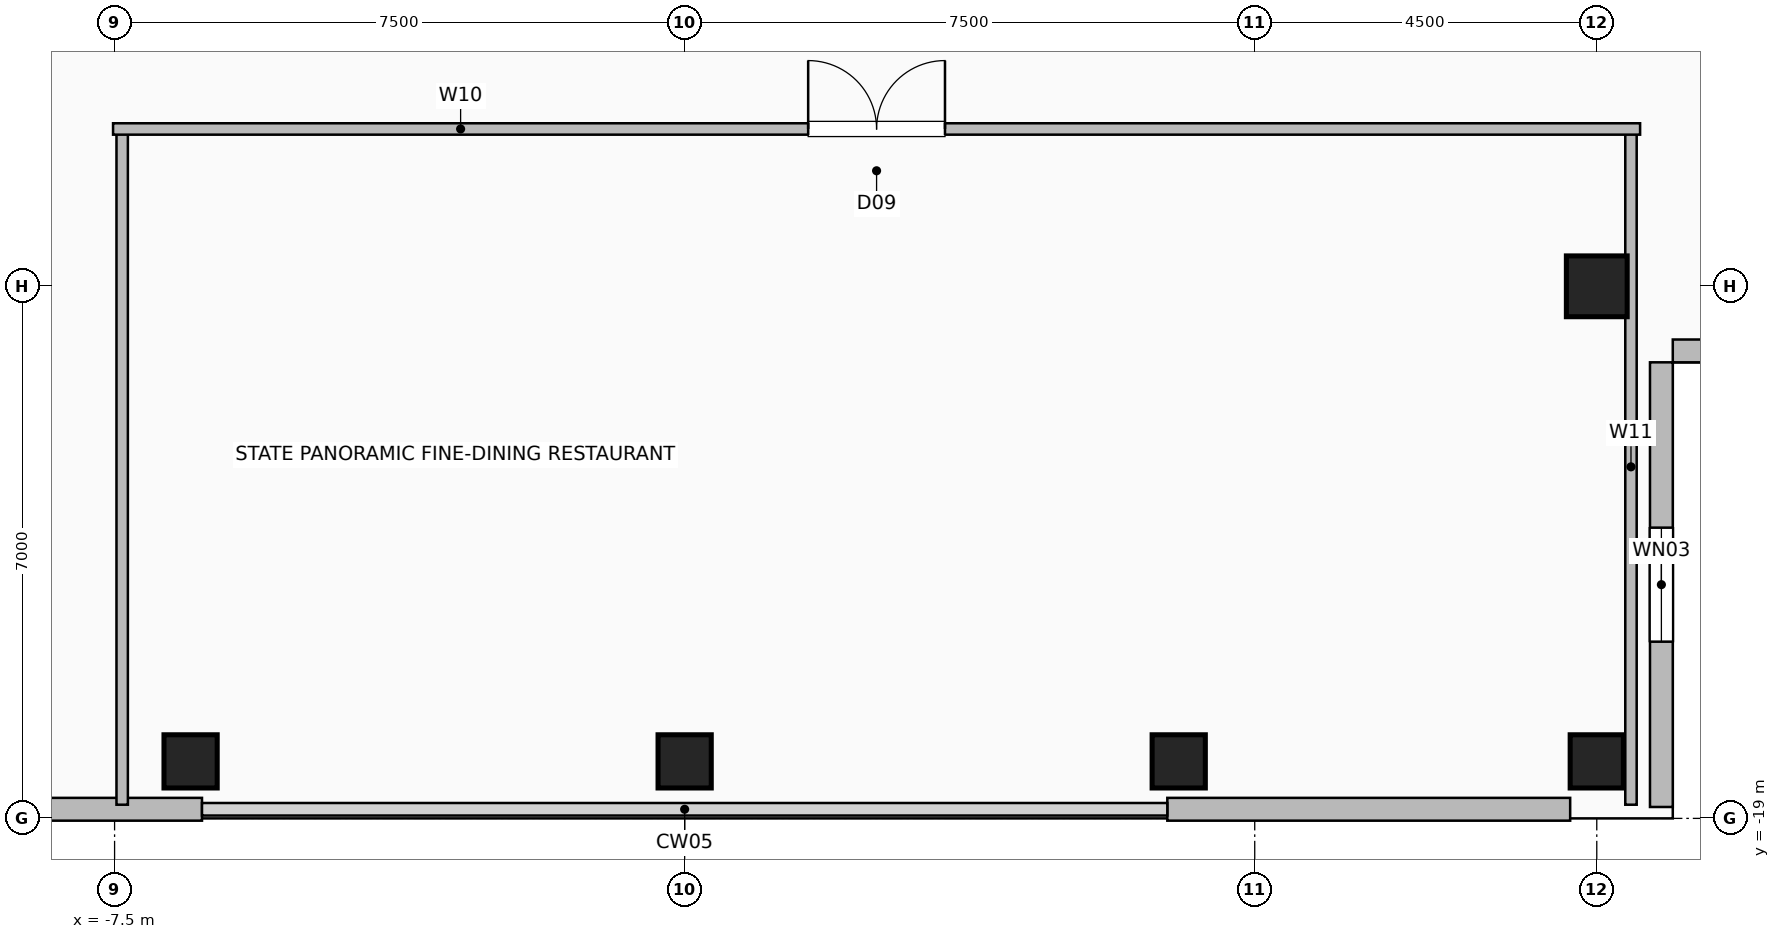
"""IFC4 building model, lengths in metres.
Left out: names, types, materials, properties, quantities, classifications, styles, units other than length and angle.
Written with IfcOpenShell. Run it as: python <this file> out.ifc"""

import sys

from ifc_helpers import new_model, si_unit, direction, frame, frame_2d, origin, origin_2d, place, context, subcontext, project, spatial, rectangle, hollow_rectangle, extrude, element, fill, save


model = new_model("IFC4")
c1 = context("Model", 3, precision=1e-05, world=origin(), true_north=direction((0.0, 1.0)))
c2 = subcontext(c1, "Body", "Model", "MODEL_VIEW")
j1 = project(units=[si_unit("LENGTHUNIT", "METRE"), si_unit("PLANEANGLEUNIT", "RADIAN")], contexts=[c1])
p1 = place(None, origin())
s1 = spatial("IfcSite", under=j1, at=p1, CompositionType="ELEMENT")
p2 = place(p1, origin())
s2 = spatial("IfcBuilding", under=s1, at=p2, CompositionType="ELEMENT")
p3 = place(p2, frame((0.0, 0.0, 257.6)))
s3 = spatial("IfcBuildingStorey", under=s2, at=p3, CompositionType="ELEMENT", Elevation=257.6)
for number, where, z_axis, x_axis in (
    (1, (-6.5, -18.25, 0.0), (0.0, 0.0, 1.0), (1.0, 0.0, 0.0)),
    (2, (0.0, -18.25, 0.0), (0.0, 0.0, 1.0), (1.0, 0.0, 0.0)),
    (3, (6.5, -18.25, 0.0), (0.0, 0.0, 1.0), (1.0, 0.0, 0.0)),
    (4, (12.0, -18.25, 0.0), (0.0, 0.0, 1.0), (1.0, 0.0, 0.0)),
):
    element("IfcColumn", number, at=place(p3, frame(where, z_axis=z_axis, x_axis=x_axis)), inside=s3, PredefinedType="COLUMN", context=c2, shape_type="SweptSolid", body=[
        extrude(hollow_rectangle(XDim=0.7, YDim=0.7, WallThickness=0.035, at=origin_2d()), origin(), (0.0, 0.0, 1.0), 3.6),
    ])
p4 = place(p3, frame((12.0, -12.0, 0.0), z_axis=(0.0, 0.0, 1.0), x_axis=(1.0, 0.0, 0.0)))
e5 = element("IfcColumn", 5, at=p4, inside=s3, PredefinedType="COLUMN", context=c2, shape_type="SweptSolid", body=[
    extrude(hollow_rectangle(XDim=0.8, YDim=0.8, WallThickness=0.04, at=origin_2d()), origin(), (0.0, 0.0, 1.0), 3.6),
])
for number, where, z_axis, x_axis in (
    (6, (-11.65, -18.88, 0.0), (0.0, 0.0, 1.0), (1.0, 0.0, 0.0)),
    (7, (6.35, -18.88, 0.0), (0.0, 0.0, 1.0), (1.0, 0.0, 0.0)),
):
    element("IfcWall", number, at=place(p3, frame(where, z_axis=z_axis, x_axis=x_axis)), inside=s3, PredefinedType="SOLIDWALL", context=c2, shape_type="SweptSolid", body=[
        extrude(rectangle(XDim=5.3, YDim=0.3, at=frame_2d((2.65, 0.0))), origin(), (0.0, 0.0, 1.0), 3.36),
    ])
p5 = place(p3, frame((12.85, -18.85, 0.0), z_axis=(0.0, 0.0, 1.0), x_axis=(0.0, 1.0, 0.0)))
e8 = element("IfcWall", 8, at=p5, inside=s3, PredefinedType="SOLIDWALL", context=c2, shape_type="SweptSolid", body=[
    extrude(rectangle(XDim=5.85, YDim=0.3, at=frame_2d((2.925, 0.0))), origin(), (0.0, 0.0, 1.0), 3.36),
])
p6 = place(p5, frame((2.175, 0.0, 0.9)))
e9 = element("IfcOpeningElement", 9, at=p6, cuts=e8, PredefinedType="OPENING", context=c2, shape_type="SweptSolid", body=[
    extrude(rectangle(XDim=1.5, YDim=1.8, at=frame_2d((0.75, 0.9))), frame((0.0, 0.16, 0.0), z_axis=(0.0, -1.0, 0.0), x_axis=(1.0, 0.0, 0.0)), (0.0, 0.0, 1.0), 0.32),
])
p7 = place(p3, frame((18.85, -12.85, 0.0), z_axis=(0.0, 0.0, 1.0), x_axis=(-1.0, 0.0, 0.0)))
e10 = element("IfcWall", 10, at=p7, inside=s3, PredefinedType="SOLIDWALL", context=c2, shape_type="SweptSolid", body=[
    extrude(rectangle(XDim=5.85, YDim=0.3, at=frame_2d((2.925, 0.0))), origin(), (0.0, 0.0, 1.0), 3.36),
])
for number, where, z_axis, x_axis in (
    (11, (-7.4, -18.82, 0.0), (0.0, 0.0, 1.0), (0.0, 1.0, 0.0)),
    (12, (12.45, -18.82, 0.0), (0.0, 0.0, 1.0), (0.0, 1.0, 0.0)),
):
    element("IfcWall", number, at=place(p3, frame(where, z_axis=z_axis, x_axis=x_axis)), inside=s3, PredefinedType="PARTITIONING", context=c2, shape_type="SweptSolid", body=[
        extrude(rectangle(XDim=8.89, YDim=0.15, at=frame_2d((4.445, 0.0))), origin(), (0.0, 0.0, 1.0), 3.36),
    ])
p8 = place(p3, frame((-7.52, -9.93, 0.0), z_axis=(0.0, 0.0, 1.0), x_axis=(1.0, 0.0, 0.0)))
e13 = element("IfcWall", 13, at=p8, inside=s3, PredefinedType="PARTITIONING", context=c2, shape_type="SweptSolid", body=[
    extrude(rectangle(XDim=20.09, YDim=0.15, at=frame_2d((10.045, 0.0))), origin(), (0.0, 0.0, 1.0), 3.36),
])
p9 = place(p8, frame((9.145, 0.0, 0.0)))
e14 = element("IfcOpeningElement", 14, at=p9, cuts=e13, PredefinedType="OPENING", context=c2, shape_type="SweptSolid", body=[
    extrude(rectangle(XDim=1.8, YDim=2.08, at=frame_2d((0.9, 1.04))), frame((0.0, 0.085, 0.0), z_axis=(0.0, -1.0, 0.0), x_axis=(1.0, 0.0, 0.0)), (0.0, 0.0, 1.0), 0.17),
])
p10 = place(p6, origin())
e15 = element("IfcWindow", 15, at=p10, inside=s3, PartitioningType="SINGLE_PANEL", PredefinedType="WINDOW", context=c2, shape_type="SweptSolid", body=[
    extrude(rectangle(XDim=1.5, YDim=1.8, at=frame_2d((0.75, 0.9))), frame((0.0, 0.03, 0.0), z_axis=(0.0, -1.0, 0.0), x_axis=(1.0, 0.0, 0.0)), (0.0, 0.0, 1.0), 0.06),
])
fill(e9, e15)
p11 = place(p9, origin())
e16 = element("IfcDoor", 16, at=p11, inside=s3, OperationType="DOUBLE_DOOR_SINGLE_SWING", PredefinedType="DOOR", context=c2, shape_type="SweptSolid", body=[
    extrude(rectangle(XDim=1.8, YDim=2.08, at=frame_2d((0.9, 1.04))), frame((0.0, 0.025, 0.0), z_axis=(0.0, -1.0, 0.0), x_axis=(1.0, 0.0, 0.0)), (0.0, 0.0, 1.0), 0.05),
])
fill(e14, e16)
save(model, sys.argv[1])
